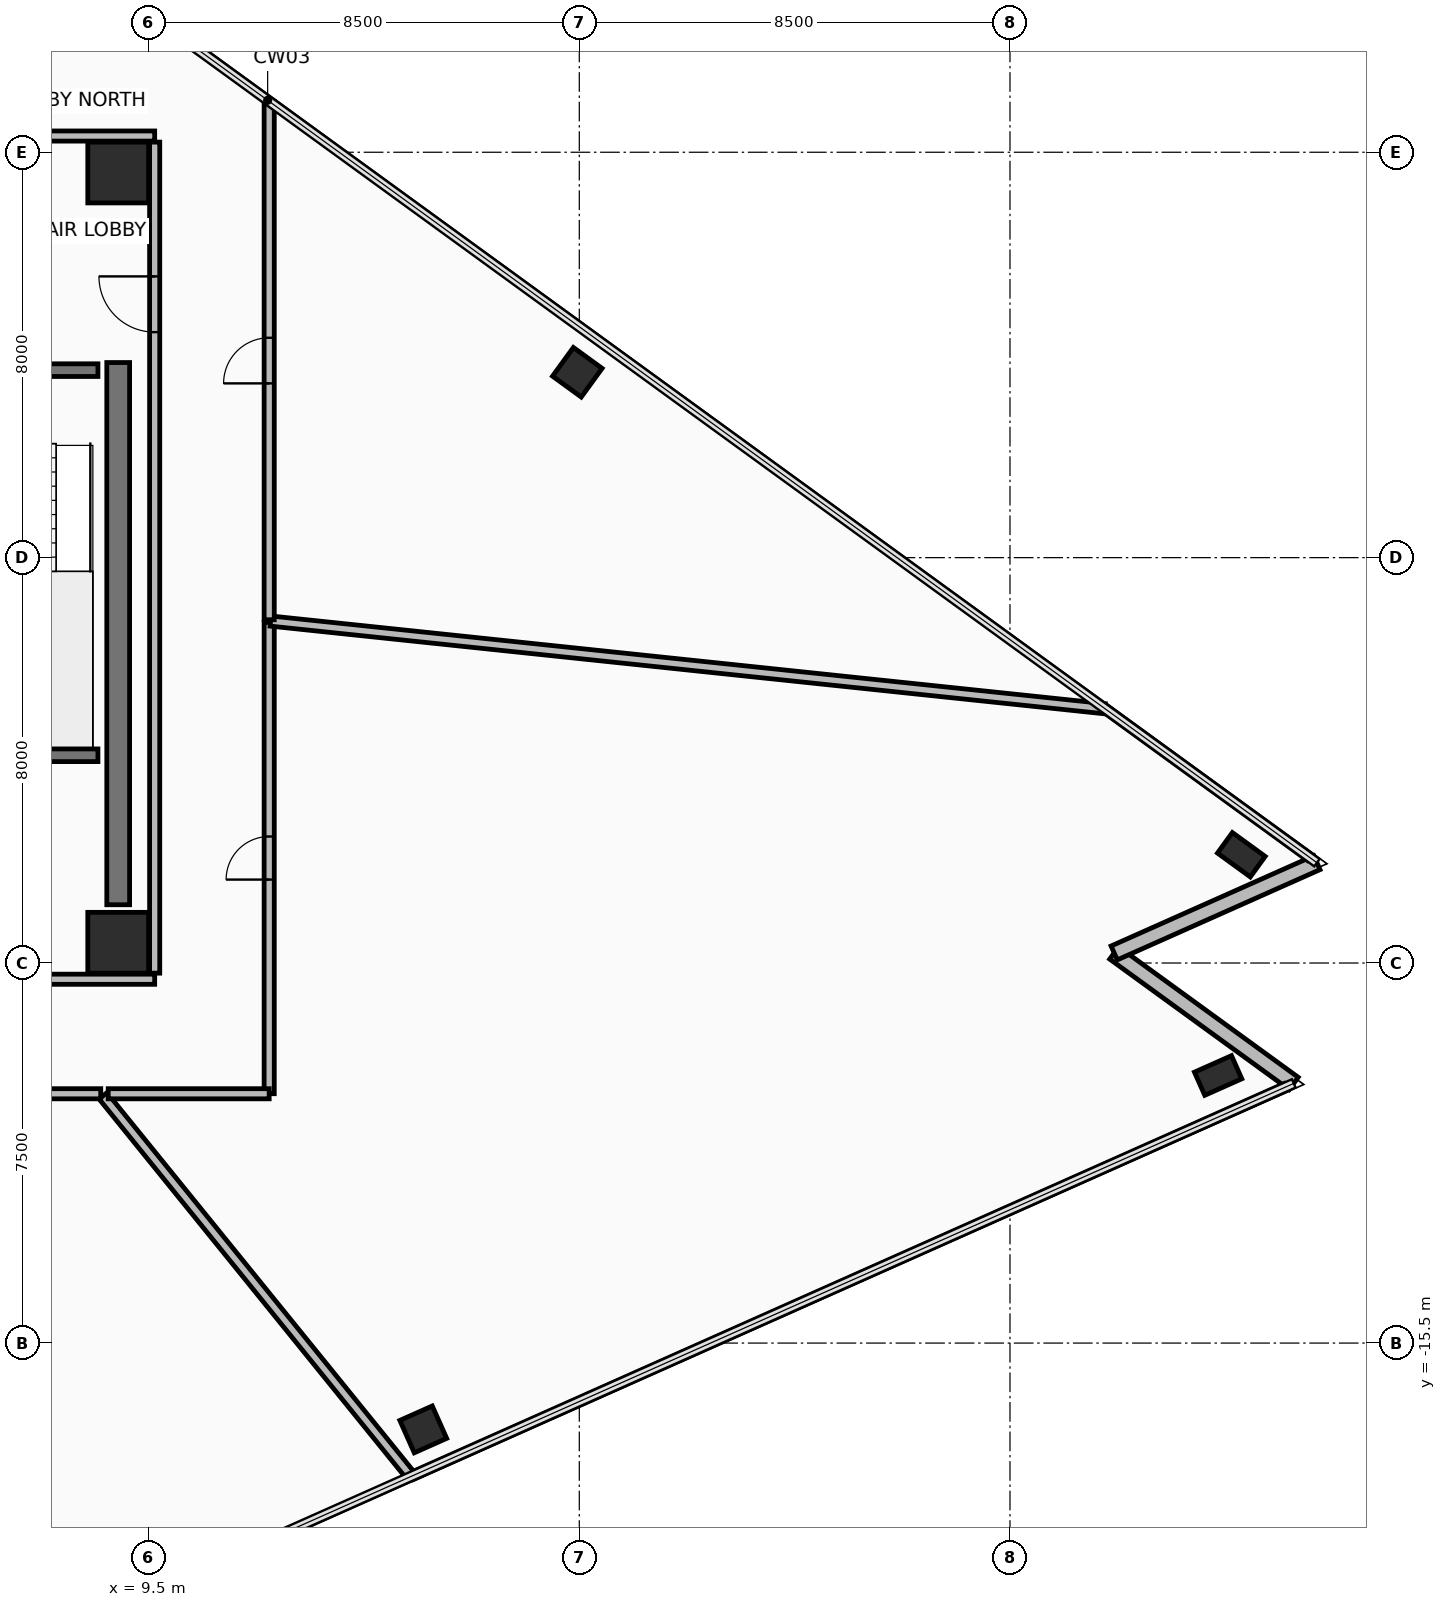
"""IFC4 building model, lengths in metres.
Left out: names, types, materials, properties, quantities, classifications, styles, units other than length and angle.
Written with IfcOpenShell. Run it as: python <this file> out.ifc"""

import sys

from ifc_helpers import new_model, si_unit, direction, frame, frame_2d, origin, origin_2d, place, context, subcontext, project, spatial, rectangle, hollow_rectangle, extrude, element, fill, save


model = new_model("IFC4")
c1 = context("Model", 3, precision=1e-05, world=origin(), true_north=direction((0.0, 1.0)))
c2 = subcontext(c1, "Body", "Model", "MODEL_VIEW")
j1 = project(units=[si_unit("LENGTHUNIT", "METRE"), si_unit("PLANEANGLEUNIT", "RADIAN")], contexts=[c1])
p1 = place(None, origin())
s1 = spatial("IfcSite", under=j1, at=p1, CompositionType="ELEMENT")
p2 = place(p1, origin())
s2 = spatial("IfcBuilding", under=s1, at=p2, CompositionType="ELEMENT")
p3 = place(p2, frame((0.0, 0.0, 119.65)))
s3 = spatial("IfcBuildingStorey", under=s2, at=p3, CompositionType="ELEMENT", Elevation=119.65)
for number, where, z_axis, x_axis in (
    (1, (8.9, -7.6, 0.0), (0.0, 0.0, 1.0), (1.0, 0.0, 0.0)),
    (2, (8.9, 7.6, 0.0), (0.0, 0.0, 1.0), (1.0, 0.0, 0.0)),
):
    element("IfcColumn", number, at=place(p3, frame(where, z_axis=z_axis, x_axis=x_axis)), inside=s3, PredefinedType="COLUMN", context=c2, shape_type="SweptSolid", body=[
        extrude(rectangle(XDim=1.2, YDim=1.2, at=origin_2d()), origin(), (0.0, 0.0, 1.0), 3.6),
    ])
p4 = place(p3, frame((14.921, -17.204, 0.0), z_axis=(0.0, 0.0, 1.0), x_axis=(0.913545457643, 0.406736643076, 0.0)))
e3 = element("IfcColumn", 3, at=p4, inside=s3, PredefinedType="COLUMN", context=c2, shape_type="SweptSolid", body=[
    extrude(hollow_rectangle(XDim=0.7, YDim=0.7, WallThickness=0.04, at=origin_2d()), origin(), (0.0, 0.0, 1.0), 3.6),
])
for number, where, z_axis, x_axis in (
    (4, (30.608, -10.219, 0.0), (0.0, 0.0, 1.0), (0.914, 0.407, 0.0)),
    (5, (31.066, -5.863, 0.0), (0.0, 0.0, 1.0), (-0.809, 0.588, 0.0)),
):
    element("IfcColumn", number, at=place(p3, frame(where, z_axis=z_axis, x_axis=x_axis)), inside=s3, PredefinedType="COLUMN", context=c2, shape_type="SweptSolid", body=[
        extrude(hollow_rectangle(XDim=0.5, YDim=0.8, WallThickness=0.04, at=origin_2d()), origin(), (0.0, 0.0, 1.0), 3.6),
    ])
p5 = place(p3, frame((17.961, 3.658, 0.0), z_axis=(0.0, 0.0, 1.0), x_axis=(-0.809016994375, 0.587785252292, 0.0)))
e6 = element("IfcColumn", 6, at=p5, inside=s3, PredefinedType="COLUMN", context=c2, shape_type="SweptSolid", body=[
    extrude(hollow_rectangle(XDim=0.7, YDim=0.7, WallThickness=0.04, at=origin_2d()), origin(), (0.0, 0.0, 1.0), 3.6),
])
for number, where, z_axis, x_axis in (
    (7, (32.1, -10.376, 0.0), (0.0, 0.0, 1.0), (-0.809, 0.588, 0.0)),
    (8, (28.556, -7.802, 0.0), (0.0, 0.0, 1.0), (0.914, 0.407, 0.0)),
):
    element("IfcWall", number, at=place(p3, frame(where, z_axis=z_axis, x_axis=x_axis)), inside=s3, PredefinedType="STANDARD", context=c2, shape_type="SweptSolid", body=[
        extrude(rectangle(XDim=4.38, YDim=0.3, at=frame_2d((2.19, 0.0))), origin(), (0.0, 0.0, 1.0), 2.705),
    ])
p6 = place(p3, frame((8.9, -6.85, 0.0), z_axis=(0.0, 0.0, 1.0), x_axis=(0.0, 1.0, 0.0)))
e9 = element("IfcWall", 9, at=p6, inside=s3, PredefinedType="SHEAR", context=c2, shape_type="SweptSolid", body=[
    extrude(rectangle(XDim=10.7, YDim=0.45, at=frame_2d((5.35, 0.0))), origin(), (0.0, 0.0, 1.0), 3.41),
])
p7 = place(p3, frame((-9.62, -8.32, 0.0), z_axis=(0.0, 0.0, 1.0), x_axis=(1.0, 0.0, 0.0)))
e10 = element("IfcWall", 10, at=p7, inside=s3, PredefinedType="PARTITIONING", context=c2, shape_type="SweptSolid", body=[
    extrude(rectangle(XDim=19.24, YDim=0.2, at=frame_2d((9.62, 0.0))), origin(), (0.0, 0.0, 1.0), 2.855),
])
p8 = place(p7, frame((7.37, 0.0, 0.0)))
e11 = element("IfcOpeningElement", 11, at=p8, cuts=e10, PredefinedType="OPENING", context=c2, shape_type="SweptSolid", body=[
    extrude(rectangle(XDim=0.9, YDim=2.1, at=frame_2d((0.45, 1.05))), frame((0.0, 0.11, 0.0), z_axis=(0.0, -1.0, 0.0), x_axis=(1.0, 0.0, 0.0)), (0.0, 0.0, 1.0), 0.22),
])
p9 = place(p7, frame((10.77, 0.0, 0.0)))
e12 = element("IfcOpeningElement", 12, at=p9, cuts=e10, PredefinedType="OPENING", context=c2, shape_type="SweptSolid", body=[
    extrude(rectangle(XDim=0.9, YDim=2.1, at=frame_2d((0.45, 1.05))), frame((0.0, 0.11, 0.0), z_axis=(0.0, -1.0, 0.0), x_axis=(1.0, 0.0, 0.0)), (0.0, 0.0, 1.0), 0.22),
])
p10 = place(p3, frame((9.62, 8.32, 0.0), z_axis=(0.0, 0.0, 1.0), x_axis=(-1.0, 0.0, 0.0)))
e13 = element("IfcWall", 13, at=p10, inside=s3, PredefinedType="PARTITIONING", context=c2, shape_type="SweptSolid", body=[
    extrude(rectangle(XDim=19.24, YDim=0.2, at=frame_2d((9.62, 0.0))), origin(), (0.0, 0.0, 1.0), 2.755),
])
p11 = place(p10, frame((15.02, 0.0, 0.0)))
e14 = element("IfcOpeningElement", 14, at=p11, cuts=e13, PredefinedType="OPENING", context=c2, shape_type="SweptSolid", body=[
    extrude(rectangle(XDim=0.9, YDim=2.1, at=frame_2d((0.45, 1.05))), frame((0.0, 0.11, 0.0), z_axis=(0.0, -1.0, 0.0), x_axis=(1.0, 0.0, 0.0)), (0.0, 0.0, 1.0), 0.22),
])
p12 = place(p3, frame((9.62, -8.2, 0.0), z_axis=(0.0, 0.0, 1.0), x_axis=(0.0, 1.0, 0.0)))
e15 = element("IfcWall", 15, at=p12, inside=s3, PredefinedType="PARTITIONING", context=c2, shape_type="SweptSolid", body=[
    extrude(rectangle(XDim=16.4, YDim=0.2, at=frame_2d((8.2, 0.0))), origin(), (0.0, 0.0, 1.0), 2.855),
])
p13 = place(p12, frame((12.65, 0.0, 0.0)))
e16 = element("IfcOpeningElement", 16, at=p13, cuts=e15, PredefinedType="OPENING", context=c2, shape_type="SweptSolid", body=[
    extrude(rectangle(XDim=1.1, YDim=2.15, at=frame_2d((0.55, 1.075))), frame((0.0, 0.11, 0.0), z_axis=(0.0, -1.0, 0.0), x_axis=(1.0, 0.0, 0.0)), (0.0, 0.0, 1.0), 0.22),
])
p14 = place(p3, frame((5.5, 3.7, 0.0), z_axis=(0.0, 0.0, 1.0), x_axis=(1.0, 0.0, 0.0)))
e17 = element("IfcWall", 17, at=p14, inside=s3, PredefinedType="SHEAR", context=c2, shape_type="SweptSolid", body=[
    extrude(rectangle(XDim=3.0, YDim=0.25, at=frame_2d((1.5, 0.0))), origin(), (0.0, 0.0, 1.0), 3.41),
])
p15 = place(p14, frame((0.95, 0.0, 0.0)))
e18 = element("IfcOpeningElement", 18, at=p15, cuts=e17, PredefinedType="OPENING", context=c2, shape_type="SweptSolid", body=[
    extrude(rectangle(XDim=1.1, YDim=2.15, at=frame_2d((0.55, 1.075))), frame((0.0, 0.135, 0.0), z_axis=(0.0, -1.0, 0.0), x_axis=(1.0, 0.0, 0.0)), (0.0, 0.0, 1.0), 0.27),
])
p16 = place(p3, frame((5.5, -3.9, 0.0), z_axis=(0.0, 0.0, 1.0), x_axis=(1.0, 0.0, 0.0)))
e19 = element("IfcWall", 19, at=p16, inside=s3, PredefinedType="SHEAR", context=c2, shape_type="SweptSolid", body=[
    extrude(rectangle(XDim=3.0, YDim=0.25, at=frame_2d((1.5, 0.0))), origin(), (0.0, 0.0, 1.0), 3.41),
])
p17 = place(p3, frame((11.88, -10.579, 0.0), z_axis=(0.0, 0.0, 1.0), x_axis=(0.0, 1.0, 0.0)))
e20 = element("IfcWall", 20, at=p17, inside=s3, PredefinedType="PARTITIONING", context=c2, shape_type="SweptSolid", body=[
    extrude(rectangle(XDim=9.303, YDim=0.2, at=frame_2d((4.651, 0.0))), origin(), (0.0, 0.0, 1.0), 2.855),
])
p18 = place(p17, frame((4.226, 0.0, 0.0)))
e21 = element("IfcOpeningElement", 21, at=p18, cuts=e20, PredefinedType="OPENING", context=c2, shape_type="SweptSolid", body=[
    extrude(rectangle(XDim=0.85, YDim=2.1, at=frame_2d((0.425, 1.05))), frame((0.0, 0.11, 0.0), z_axis=(0.0, -1.0, 0.0), x_axis=(1.0, 0.0, 0.0)), (0.0, 0.0, 1.0), 0.22),
])
p19 = place(p3, frame((11.908, -1.251, 0.0), z_axis=(0.0, 0.0, 1.0), x_axis=(0.994520958229, -0.104537379166, 0.0)))
e22 = element("IfcWall", 22, at=p19, inside=s3, PredefinedType="PARTITIONING", context=c2, shape_type="SweptSolid", body=[
    extrude(rectangle(XDim=16.553, YDim=0.2, at=frame_2d((8.277, 0.0))), origin(), (0.0, 0.0, 1.0), 2.705),
])
p20 = place(p3, frame((28.383, -2.987, 0.0), z_axis=(0.0, 0.0, 1.0), x_axis=(0.809028426751, -0.587769516655, 0.0)))
e23 = element("IfcWall", 23, at=p20, inside=s3, PredefinedType="PARTITIONING", context=c2, shape_type="SweptSolid", body=[
    extrude(rectangle(XDim=4.982, YDim=0.15, at=frame_2d((2.491, 0.0))), origin(), (0.0, 0.0, 1.0), 3.41),
])
p21 = place(p3, frame((31.936, -10.449, 0.0), z_axis=(0.0, 0.0, 1.0), x_axis=(-0.913543488342, -0.406741066168, 0.0)))
e24 = element("IfcWall", 24, at=p21, inside=s3, PredefinedType="PARTITIONING", context=c2, shape_type="SweptSolid", body=[
    extrude(rectangle(XDim=18.868, YDim=0.15, at=frame_2d((9.434, 0.0))), origin(), (0.0, 0.0, 1.0), 3.41),
])
p22 = place(p3, frame((14.67, -18.116, 0.0), z_axis=(0.0, 0.0, 1.0), x_axis=(-0.629302356579, 0.777160565137, 0.0)))
e25 = element("IfcWall", 25, at=p22, inside=s3, PredefinedType="PARTITIONING", context=c2, shape_type="SweptSolid", body=[
    extrude(rectangle(XDim=9.645, YDim=0.2, at=frame_2d((4.822, 0.0))), origin(), (0.0, 0.0, 1.0), 2.705),
])
p23 = place(p3, frame((8.703, -10.58, 0.0), z_axis=(0.0, 0.0, 1.0), x_axis=(1.0, 0.0, 0.0)))
e26 = element("IfcWall", 26, at=p23, inside=s3, PredefinedType="PARTITIONING", context=c2, shape_type="SweptSolid", body=[
    extrude(rectangle(XDim=3.177, YDim=0.2, at=frame_2d((1.588, 0.0))), origin(), (0.0, 0.0, 1.0), 2.855),
])
p24 = place(p3, frame((-1.09, -10.58, 0.0), z_axis=(0.0, 0.0, 1.0), x_axis=(1.0, 0.0, 0.0)))
e27 = element("IfcWall", 27, at=p24, inside=s3, PredefinedType="PARTITIONING", context=c2, shape_type="SweptSolid", body=[
    extrude(rectangle(XDim=9.645, YDim=0.2, at=frame_2d((4.823, 0.0))), origin(), (0.0, 0.0, 1.0), 3.41),
])
p25 = place(p24, frame((4.323, 0.0, 0.0)))
e28 = element("IfcOpeningElement", 28, at=p25, cuts=e27, PredefinedType="OPENING", context=c2, shape_type="SweptSolid", body=[
    extrude(rectangle(XDim=1.0, YDim=2.15, at=frame_2d((0.5, 1.075))), frame((0.0, 0.11, 0.0), z_axis=(0.0, -1.0, 0.0), x_axis=(1.0, 0.0, 0.0)), (0.0, 0.0, 1.0), 0.22),
])
p26 = place(p3, frame((11.88, -1.226, 0.0), z_axis=(0.0, 0.0, 1.0), x_axis=(0.0, 1.0, 0.0)))
e29 = element("IfcWall", 29, at=p26, inside=s3, PredefinedType="PARTITIONING", context=c2, shape_type="SweptSolid", body=[
    extrude(rectangle(XDim=10.229, YDim=0.2, at=frame_2d((5.115, 0.0))), origin(), (0.0, 0.0, 1.0), 2.705),
])
p27 = place(p26, frame((4.665, 0.0, 0.0)))
e30 = element("IfcOpeningElement", 30, at=p27, cuts=e29, PredefinedType="OPENING", context=c2, shape_type="SweptSolid", body=[
    extrude(rectangle(XDim=0.9, YDim=2.1, at=frame_2d((0.45, 1.05))), frame((0.0, 0.11, 0.0), z_axis=(0.0, -1.0, 0.0), x_axis=(1.0, 0.0, 0.0)), (0.0, 0.0, 1.0), 0.22),
])
p28 = place(p13, frame((1.1, 0.0, 0.0), z_axis=(0.0, 0.0, 1.0), x_axis=(-1.0, 0.0, 0.0)))
e31 = element("IfcDoor", 31, at=p28, inside=s3, OperationType="SINGLE_SWING_LEFT", PredefinedType="DOOR", context=c2, shape_type="SweptSolid", body=[
    extrude(rectangle(XDim=1.1, YDim=2.15, at=frame_2d((0.55, 1.075))), frame((0.0, 0.025, 0.0), z_axis=(0.0, -1.0, 0.0), x_axis=(1.0, 0.0, 0.0)), (0.0, 0.0, 1.0), 0.05),
])
fill(e16, e31)
p29 = place(p18, origin())
e32 = element("IfcDoor", 32, at=p29, inside=s3, OperationType="SINGLE_SWING_RIGHT", PredefinedType="DOOR", context=c2, shape_type="SweptSolid", body=[
    extrude(rectangle(XDim=0.85, YDim=2.1, at=frame_2d((0.425, 1.05))), frame((0.0, 0.025, 0.0), z_axis=(0.0, -1.0, 0.0), x_axis=(1.0, 0.0, 0.0)), (0.0, 0.0, 1.0), 0.05),
])
fill(e21, e32)
p30 = place(p27, origin())
e33 = element("IfcDoor", 33, at=p30, inside=s3, OperationType="SINGLE_SWING_LEFT", PredefinedType="DOOR", context=c2, shape_type="SweptSolid", body=[
    extrude(rectangle(XDim=0.9, YDim=2.1, at=frame_2d((0.45, 1.05))), frame((0.0, 0.025, 0.0), z_axis=(0.0, -1.0, 0.0), x_axis=(1.0, 0.0, 0.0)), (0.0, 0.0, 1.0), 0.05),
])
fill(e30, e33)
save(model, sys.argv[1])
